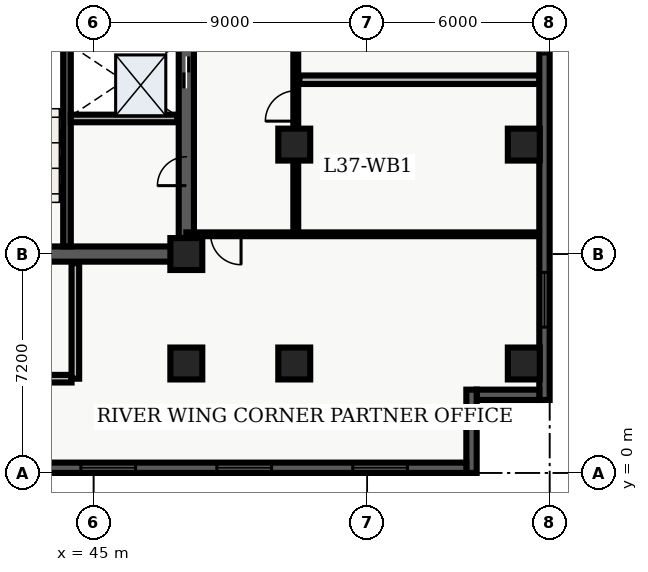
"""IFC4 building model, lengths in metres.
Left out: names, types, materials, properties, quantities, classifications, styles, units other than length and angle.
Written with IfcOpenShell. Run it as: python <this file> out.ifc"""

import sys

from ifc_helpers import new_model, entity, si_unit, converted_unit, direction, frame, origin_with_axes, origin_2d_with_axis, place, context, subcontext, project, spatial, polyline, rectangle, outline, extrude, element, fill, save


model = new_model("IFC4")
c1 = context("Model", 3, precision=1e-05, world=origin_with_axes(), true_north=direction((0.0, 1.0)))
c2 = subcontext(c1, "Body", "Model", "MODEL_VIEW")
j1 = project(units=[si_unit("LENGTHUNIT", "METRE"), converted_unit("PLANEANGLEUNIT", "DEGREE", entity("IfcPlaneAngleMeasure", 0.017), si_unit("PLANEANGLEUNIT", "RADIAN"), dimensions=[0, 0, 0, 0, 0, 0, 0])], contexts=[c1])
p1 = place(None, origin_with_axes())
s1 = spatial("IfcSite", under=j1, at=p1, CompositionType="ELEMENT")
p2 = place(p1, origin_with_axes())
s2 = spatial("IfcBuilding", under=s1, at=p2, CompositionType="ELEMENT")
p3 = place(p2, frame((0.0, 0.0, 152.4), z_axis=(0.0, 0.0, 1.0), x_axis=(1.0, 0.0, 0.0)))
s3 = spatial("IfcBuildingStorey", under=s2, at=p3, CompositionType="ELEMENT", Elevation=152.4)
p4 = place(p3, frame((40.2, 7.2, 0.0), z_axis=(0.0, 0.0, 1.0), x_axis=(1.0, 0.0, 0.0)))
e1 = element("IfcWall", 1, at=p4, inside=s3, PredefinedType="SHEAR", context=c2, shape_type="SweptSolid", body=[
    extrude(outline(polyline([(0.0, -0.25), (7.85, -0.25), (7.85, 0.25), (0.0, 0.25), (0.0, -0.25)])), origin_with_axes(), (0.0, 0.0, 1.0), 3.66),
])
p5 = place(p4, frame((2.175, 0.0, 0.0), z_axis=(0.0, 0.0, 1.0), x_axis=(1.0, 0.0, 0.0)))
e2 = element("IfcOpeningElement", 2, at=p5, cuts=e1, PredefinedType="OPENING", context=c2, shape_type="SweptSolid", body=[
    extrude(rectangle(XDim=1.05, YDim=0.52, at=origin_2d_with_axis()), origin_with_axes(), (0.0, 0.0, 1.0), 2.15),
])
p6 = place(p3, frame((48.05, 7.2, 0.0), z_axis=(0.0, 0.0, 1.0), x_axis=(0.0, 1.0, 0.0)))
e3 = element("IfcWall", 3, at=p6, inside=s3, PredefinedType="SHEAR", context=c2, shape_type="SweptSolid", body=[
    extrude(outline(polyline([(0.0, -0.25), (15.6, -0.25), (15.6, 0.25), (0.0, 0.25), (0.0, -0.25)])), origin_with_axes(), (0.0, 0.0, 1.0), 3.66),
])
p7 = place(p6, frame((5.975, 0.0, 0.0), z_axis=(0.0, 0.0, 1.0), x_axis=(1.0, 0.0, 0.0)))
e4 = element("IfcOpeningElement", 4, at=p7, cuts=e3, PredefinedType="OPENING", context=c2, shape_type="SweptSolid", body=[
    extrude(rectangle(XDim=1.05, YDim=0.52, at=origin_2d_with_axis()), origin_with_axes(), (0.0, 0.0, 1.0), 2.15),
])
p8 = place(p6, frame((2.725, 0.0, 0.0), z_axis=(0.0, 0.0, 1.0), x_axis=(1.0, 0.0, 0.0)))
e5 = element("IfcOpeningElement", 5, at=p8, cuts=e3, PredefinedType="OPENING", context=c2, shape_type="SweptSolid", body=[
    extrude(rectangle(XDim=0.95, YDim=0.52, at=origin_2d_with_axis()), origin_with_axes(), (0.0, 0.0, 1.0), 2.15),
])
p9 = place(p3, frame((44.125, 7.45, 0.0), z_axis=(0.0, 0.0, 1.0), x_axis=(0.0, 1.0, 0.0)))
e6 = element("IfcWall", 6, at=p9, inside=s3, PredefinedType="SHEAR", context=c2, shape_type="SweptSolid", body=[
    extrude(outline(polyline([(0.0, -0.125), (15.1, -0.125), (15.1, 0.125), (0.0, 0.125), (0.0, -0.125)])), origin_with_axes(), (0.0, 0.0, 1.0), 3.66),
])
p10 = place(p3, frame((40.325, 3.1, 0.0), z_axis=(0.0, 0.0, 1.0), x_axis=(1.0, 0.0, 0.0)))
e7 = element("IfcWall", 7, at=p10, inside=s3, PredefinedType="SOLIDWALL", context=c2, shape_type="SweptSolid", body=[
    extrude(outline(polyline([(0.0, -0.125), (3.95, -0.125), (3.95, 0.125), (0.0, 0.125), (0.0, -0.125)])), origin_with_axes(), (0.0, 0.0, 1.0), 2.7),
])
p11 = place(p3, frame((44.4, 3.1, 0.0), z_axis=(0.0, 0.0, 1.0), x_axis=(0.0, 1.0, 0.0)))
e8 = element("IfcWall", 8, at=p11, inside=s3, PredefinedType="SOLIDWALL", context=c2, shape_type="SweptSolid", body=[
    extrude(outline(polyline([(0.0, -0.125), (3.8, -0.125), (3.8, 0.125), (0.0, 0.125), (0.0, -0.125)])), origin_with_axes(), (0.0, 0.0, 1.0), 2.7),
])
for number, where, z_axis, x_axis in (
    (9, (48.05, 3.6, 0.0), (0.0, 0.0, 1.0), (1.0, 0.0, 0.0)),
    (10, (48.05, 7.2, 0.0), (0.0, 0.0, 1.0), (1.0, 0.0, 0.0)),
    (11, (51.6, 3.6, 0.0), (0.0, 0.0, 1.0), (1.0, 0.0, 0.0)),
    (12, (51.6, 10.8, 0.0), (0.0, 0.0, 1.0), (1.0, 0.0, 0.0)),
    (13, (59.15, 3.6, 0.0), (0.0, 0.0, 1.0), (1.0, 0.0, 0.0)),
    (14, (59.15, 10.8, 0.0), (0.0, 0.0, 1.0), (1.0, 0.0, 0.0)),
):
    element("IfcColumn", number, at=place(p3, frame(where, z_axis=z_axis, x_axis=x_axis)), inside=s3, PredefinedType="COLUMN", context=c2, shape_type="SweptSolid", body=[
        extrude(rectangle(XDim=1.05, YDim=1.05, at=origin_2d_with_axis()), origin_with_axes(), (0.0, 0.0, 1.0), 3.9),
    ])
p12 = place(p3, frame((44.25, 11.66, 0.0), z_axis=(0.0, 0.0, 1.0), x_axis=(1.0, 0.0, 0.0)))
e15 = element("IfcWall", 15, at=p12, inside=s3, PredefinedType="SOLIDWALL", context=c2, shape_type="SweptSolid", body=[
    extrude(outline(polyline([(0.0, -0.125), (3.5, -0.125), (3.5, 0.125), (0.0, 0.125), (0.0, -0.125)])), origin_with_axes(), (0.0, 0.0, 1.0), 2.7),
])
p13 = place(p3, frame((51.65, 7.85, 0.0), z_axis=(0.0, 0.0, 1.0), x_axis=(0.0, 1.0, 0.0)))
e16 = element("IfcWall", 16, at=p13, inside=s3, PredefinedType="PARTITIONING", context=c2, shape_type="SweptSolid", body=[
    extrude(outline(polyline([(0.0, -0.08), (18.8, -0.08), (18.8, 0.08), (0.0, 0.08), (0.0, -0.08)])), origin_with_axes(), (0.0, 0.0, 1.0), 2.7),
])
p14 = place(p13, frame((4.222, 0.0, 0.0), z_axis=(0.0, 0.0, 1.0), x_axis=(1.0, 0.0, 0.0)))
e17 = element("IfcOpeningElement", 17, at=p14, cuts=e16, PredefinedType="OPENING", context=c2, shape_type="SweptSolid", body=[
    extrude(rectangle(XDim=1.0, YDim=0.18, at=origin_2d_with_axis()), origin_with_axes(), (0.0, 0.0, 1.0), 2.15),
])
p15 = place(p13, frame((7.845, 0.0, 0.0), z_axis=(0.0, 0.0, 1.0), x_axis=(1.0, 0.0, 0.0)))
e18 = element("IfcOpeningElement", 18, at=p15, cuts=e16, PredefinedType="OPENING", context=c2, shape_type="SweptSolid", body=[
    extrude(rectangle(XDim=1.0, YDim=0.18, at=origin_2d_with_axis()), origin_with_axes(), (0.0, 0.0, 1.0), 2.15),
])
p16 = place(p13, frame((14.072, 0.0, 0.0), z_axis=(0.0, 0.0, 1.0), x_axis=(1.0, 0.0, 0.0)))
e19 = element("IfcOpeningElement", 19, at=p16, cuts=e16, PredefinedType="OPENING", context=c2, shape_type="SweptSolid", body=[
    extrude(rectangle(XDim=1.0, YDim=0.18, at=origin_2d_with_axis()), origin_with_axes(), (0.0, 0.0, 1.0), 2.15),
])
p17 = place(p3, frame((59.665, 7.85, 0.0), z_axis=(0.0, 0.0, 1.0), x_axis=(-1.0, 0.0, 0.0)))
e20 = element("IfcWall", 20, at=p17, inside=s3, PredefinedType="PARTITIONING", context=c2, shape_type="SweptSolid", body=[
    extrude(outline(polyline([(0.0, -0.062), (11.615, -0.062), (11.615, 0.062), (0.0, 0.062), (0.0, -0.062)])), origin_with_axes(), (0.0, 0.0, 1.0), 2.7),
])
p18 = place(p17, frame((10.315, 0.0, 0.0), z_axis=(0.0, 0.0, 1.0), x_axis=(1.0, 0.0, 0.0)))
e21 = element("IfcOpeningElement", 21, at=p18, cuts=e20, PredefinedType="OPENING", context=c2, shape_type="SweptSolid", body=[
    extrude(rectangle(XDim=1.0, YDim=0.145, at=origin_2d_with_axis()), origin_with_axes(), (0.0, 0.0, 1.0), 2.15),
])
p19 = place(p3, frame((51.77, 12.934, 0.0), z_axis=(0.0, 0.0, 1.0), x_axis=(1.0, 0.0, 0.0)))
e22 = element("IfcWall", 22, at=p19, inside=s3, PredefinedType="PARTITIONING", context=c2, shape_type="SweptSolid", body=[
    extrude(outline(polyline([(0.0, -0.14), (7.895, -0.14), (7.895, 0.14), (0.0, 0.14), (0.0, -0.14)])), origin_with_axes(), (0.0, 0.0, 1.0), 2.7),
])
p20 = place(p3, frame((59.83, 26.06, 0.0), z_axis=(0.0, 0.0, 1.0), x_axis=(0.0, -1.0, 0.0)))
e23 = element("IfcWall", 23, at=p20, inside=s3, PredefinedType="SOLIDWALL", context=c2, shape_type="SweptSolid", body=[
    extrude(outline(polyline([(0.0, -0.17), (23.66, -0.17), (23.66, 0.17), (0.0, 0.17), (0.0, -0.17)])), origin_with_axes(), (0.0, 0.0, 1.0), 3.66),
])
p21 = place(p20, frame((3.696, 0.0, 0.45), z_axis=(0.0, 0.0, 1.0), x_axis=(1.0, 0.0, 0.0)))
e24 = element("IfcOpeningElement", 24, at=p21, cuts=e23, PredefinedType="OPENING", context=c2, shape_type="SweptSolid", body=[
    extrude(rectangle(XDim=1.8, YDim=0.36, at=origin_2d_with_axis()), origin_with_axes(), (0.0, 0.0, 1.0), 2.1),
])
p22 = place(p20, frame((11.38, 0.0, 0.45), z_axis=(0.0, 0.0, 1.0), x_axis=(1.0, 0.0, 0.0)))
e25 = element("IfcOpeningElement", 25, at=p22, cuts=e23, PredefinedType="OPENING", context=c2, shape_type="SweptSolid", body=[
    extrude(rectangle(XDim=1.8, YDim=0.36, at=origin_2d_with_axis()), origin_with_axes(), (0.0, 0.0, 1.0), 2.1),
])
p23 = place(p20, frame((20.364, 0.0, 0.45), z_axis=(0.0, 0.0, 1.0), x_axis=(1.0, 0.0, 0.0)))
e26 = element("IfcOpeningElement", 26, at=p23, cuts=e23, PredefinedType="OPENING", context=c2, shape_type="SweptSolid", body=[
    extrude(rectangle(XDim=1.8, YDim=0.36, at=origin_2d_with_axis()), origin_with_axes(), (0.0, 0.0, 1.0), 2.1),
])
p24 = place(p3, frame((59.66, 2.57, 0.0), z_axis=(0.0, 0.0, 1.0), x_axis=(-1.0, 0.0, 0.0)))
e27 = element("IfcWall", 27, at=p24, inside=s3, PredefinedType="SOLIDWALL", context=c2, shape_type="SweptSolid", body=[
    extrude(outline(polyline([(0.0, -0.17), (2.06, -0.17), (2.06, 0.17), (0.0, 0.17), (0.0, -0.17)])), origin_with_axes(), (0.0, 0.0, 1.0), 3.66),
])
p25 = place(p3, frame((57.43, 2.74, 0.0), z_axis=(0.0, 0.0, 1.0), x_axis=(0.0, -1.0, 0.0)))
e28 = element("IfcWall", 28, at=p25, inside=s3, PredefinedType="SOLIDWALL", context=c2, shape_type="SweptSolid", body=[
    extrude(outline(polyline([(0.0, -0.17), (2.74, -0.17), (2.74, 0.17), (0.0, 0.17), (0.0, -0.17)])), origin_with_axes(), (0.0, 0.0, 1.0), 3.66),
])
p26 = place(p3, frame((57.26, 0.17, 0.0), z_axis=(0.0, 0.0, 1.0), x_axis=(-1.0, 0.0, 0.0)))
e29 = element("IfcWall", 29, at=p26, inside=s3, PredefinedType="SOLIDWALL", context=c2, shape_type="SweptSolid", body=[
    extrude(outline(polyline([(0.0, -0.17), (54.86, -0.17), (54.86, 0.17), (0.0, 0.17), (0.0, -0.17)])), origin_with_axes(), (0.0, 0.0, 1.0), 3.66),
])
p27 = place(p26, frame((2.836, 0.0, 0.45), z_axis=(0.0, 0.0, 1.0), x_axis=(1.0, 0.0, 0.0)))
e30 = element("IfcOpeningElement", 30, at=p27, cuts=e29, PredefinedType="OPENING", context=c2, shape_type="SweptSolid", body=[
    extrude(rectangle(XDim=1.8, YDim=0.36, at=origin_2d_with_axis()), origin_with_axes(), (0.0, 0.0, 1.0), 2.1),
])
p28 = place(p26, frame((7.307, 0.0, 0.45), z_axis=(0.0, 0.0, 1.0), x_axis=(1.0, 0.0, 0.0)))
e31 = element("IfcOpeningElement", 31, at=p28, cuts=e29, PredefinedType="OPENING", context=c2, shape_type="SweptSolid", body=[
    extrude(rectangle(XDim=1.8, YDim=0.36, at=origin_2d_with_axis()), origin_with_axes(), (0.0, 0.0, 1.0), 2.1),
])
p29 = place(p26, frame((11.779, 0.0, 0.45), z_axis=(0.0, 0.0, 1.0), x_axis=(1.0, 0.0, 0.0)))
e32 = element("IfcOpeningElement", 32, at=p29, cuts=e29, PredefinedType="OPENING", context=c2, shape_type="SweptSolid", body=[
    extrude(rectangle(XDim=1.8, YDim=0.36, at=origin_2d_with_axis()), origin_with_axes(), (0.0, 0.0, 1.0), 2.1),
])
p30 = place(p26, frame((16.251, 0.0, 0.45), z_axis=(0.0, 0.0, 1.0), x_axis=(1.0, 0.0, 0.0)))
e33 = element("IfcOpeningElement", 33, at=p30, cuts=e29, PredefinedType="OPENING", context=c2, shape_type="SweptSolid", body=[
    extrude(rectangle(XDim=1.8, YDim=0.36, at=origin_2d_with_axis()), origin_with_axes(), (0.0, 0.0, 1.0), 2.1),
])
p31 = place(p26, frame((20.723, 0.0, 0.45), z_axis=(0.0, 0.0, 1.0), x_axis=(1.0, 0.0, 0.0)))
e34 = element("IfcOpeningElement", 34, at=p31, cuts=e29, PredefinedType="OPENING", context=c2, shape_type="SweptSolid", body=[
    extrude(rectangle(XDim=1.8, YDim=0.36, at=origin_2d_with_axis()), origin_with_axes(), (0.0, 0.0, 1.0), 2.1),
])
p32 = place(p26, frame((25.194, 0.0, 0.45), z_axis=(0.0, 0.0, 1.0), x_axis=(1.0, 0.0, 0.0)))
e35 = element("IfcOpeningElement", 35, at=p32, cuts=e29, PredefinedType="OPENING", context=c2, shape_type="SweptSolid", body=[
    extrude(rectangle(XDim=1.8, YDim=0.36, at=origin_2d_with_axis()), origin_with_axes(), (0.0, 0.0, 1.0), 2.1),
])
p33 = place(p26, frame((29.666, 0.0, 0.45), z_axis=(0.0, 0.0, 1.0), x_axis=(1.0, 0.0, 0.0)))
e36 = element("IfcOpeningElement", 36, at=p33, cuts=e29, PredefinedType="OPENING", context=c2, shape_type="SweptSolid", body=[
    extrude(rectangle(XDim=1.8, YDim=0.36, at=origin_2d_with_axis()), origin_with_axes(), (0.0, 0.0, 1.0), 2.1),
])
p34 = place(p26, frame((34.138, 0.0, 0.45), z_axis=(0.0, 0.0, 1.0), x_axis=(1.0, 0.0, 0.0)))
e37 = element("IfcOpeningElement", 37, at=p34, cuts=e29, PredefinedType="OPENING", context=c2, shape_type="SweptSolid", body=[
    extrude(rectangle(XDim=1.8, YDim=0.36, at=origin_2d_with_axis()), origin_with_axes(), (0.0, 0.0, 1.0), 2.1),
])
p35 = place(p26, frame((38.609, 0.0, 0.45), z_axis=(0.0, 0.0, 1.0), x_axis=(1.0, 0.0, 0.0)))
e38 = element("IfcOpeningElement", 38, at=p35, cuts=e29, PredefinedType="OPENING", context=c2, shape_type="SweptSolid", body=[
    extrude(rectangle(XDim=1.8, YDim=0.36, at=origin_2d_with_axis()), origin_with_axes(), (0.0, 0.0, 1.0), 2.1),
])
p36 = place(p26, frame((43.081, 0.0, 0.45), z_axis=(0.0, 0.0, 1.0), x_axis=(1.0, 0.0, 0.0)))
e39 = element("IfcOpeningElement", 39, at=p36, cuts=e29, PredefinedType="OPENING", context=c2, shape_type="SweptSolid", body=[
    extrude(rectangle(XDim=1.8, YDim=0.36, at=origin_2d_with_axis()), origin_with_axes(), (0.0, 0.0, 1.0), 2.1),
])
p37 = place(p26, frame((48.003, 0.0, 0.45), z_axis=(0.0, 0.0, 1.0), x_axis=(1.0, 0.0, 0.0)))
e40 = element("IfcOpeningElement", 40, at=p37, cuts=e29, PredefinedType="OPENING", context=c2, shape_type="SweptSolid", body=[
    extrude(rectangle(XDim=1.8, YDim=0.36, at=origin_2d_with_axis()), origin_with_axes(), (0.0, 0.0, 1.0), 2.1),
])
p38 = place(p26, frame((52.024, 0.0, 0.45), z_axis=(0.0, 0.0, 1.0), x_axis=(1.0, 0.0, 0.0)))
e41 = element("IfcOpeningElement", 41, at=p38, cuts=e29, PredefinedType="OPENING", context=c2, shape_type="SweptSolid", body=[
    extrude(rectangle(XDim=1.8, YDim=0.36, at=origin_2d_with_axis()), origin_with_axes(), (0.0, 0.0, 1.0), 2.1),
])
p39 = place(p6, frame((5.975, 0.0, 0.0), z_axis=(0.0, 0.0, 1.0), x_axis=(1.0, 0.0, 0.0)))
e42 = element("IfcDoor", 42, at=p39, inside=s3, OperationType="SLIDING_TO_LEFT", PredefinedType="DOOR", context=c2, shape_type="SweptSolid", body=[
    extrude(rectangle(XDim=1.05, YDim=0.09, at=origin_2d_with_axis()), origin_with_axes(), (0.0, 0.0, 1.0), 2.15),
])
fill(e4, e42)
p40 = place(p6, frame((2.725, 0.0, 0.0), z_axis=(0.0, 0.0, 1.0), x_axis=(1.0, 0.0, 0.0)))
e43 = element("IfcDoor", 43, at=p40, inside=s3, OperationType="SINGLE_SWING_LEFT", PredefinedType="DOOR", context=c2, shape_type="SweptSolid", body=[
    extrude(rectangle(XDim=0.95, YDim=0.09, at=origin_2d_with_axis()), origin_with_axes(), (0.0, 0.0, 1.0), 2.15),
])
fill(e5, e43)
p41 = place(p17, frame((10.315, 0.0, 0.0), z_axis=(0.0, 0.0, 1.0), x_axis=(1.0, 0.0, 0.0)))
e44 = element("IfcDoor", 44, at=p41, inside=s3, OperationType="SINGLE_SWING_LEFT", PredefinedType="DOOR", context=c2, shape_type="SweptSolid", body=[
    extrude(rectangle(XDim=1.0, YDim=0.075, at=origin_2d_with_axis()), origin_with_axes(), (0.0, 0.0, 1.0), 2.15),
])
fill(e21, e44)
p42 = place(p13, frame((4.222, 0.0, 0.0), z_axis=(0.0, 0.0, 1.0), x_axis=(1.0, 0.0, 0.0)))
e45 = element("IfcDoor", 45, at=p42, inside=s3, OperationType="SINGLE_SWING_LEFT", PredefinedType="DOOR", context=c2, shape_type="SweptSolid", body=[
    extrude(rectangle(XDim=1.0, YDim=0.09, at=origin_2d_with_axis()), origin_with_axes(), (0.0, 0.0, 1.0), 2.15),
])
fill(e17, e45)
p43 = place(p20, frame((11.38, 0.0, 0.45), z_axis=(0.0, 0.0, 1.0), x_axis=(1.0, 0.0, 0.0)))
e46 = element("IfcWindow", 46, at=p43, inside=s3, PredefinedType="WINDOW", context=c2, shape_type="SweptSolid", body=[
    extrude(rectangle(XDim=1.8, YDim=0.09, at=origin_2d_with_axis()), origin_with_axes(), (0.0, 0.0, 1.0), 2.1),
])
fill(e25, e46)
p44 = place(p20, frame((20.364, 0.0, 0.45), z_axis=(0.0, 0.0, 1.0), x_axis=(1.0, 0.0, 0.0)))
e47 = element("IfcWindow", 47, at=p44, inside=s3, PredefinedType="WINDOW", context=c2, shape_type="SweptSolid", body=[
    extrude(rectangle(XDim=1.8, YDim=0.09, at=origin_2d_with_axis()), origin_with_axes(), (0.0, 0.0, 1.0), 2.1),
])
fill(e26, e47)
p45 = place(p26, frame((2.836, 0.0, 0.45), z_axis=(0.0, 0.0, 1.0), x_axis=(1.0, 0.0, 0.0)))
e48 = element("IfcWindow", 48, at=p45, inside=s3, PredefinedType="WINDOW", context=c2, shape_type="SweptSolid", body=[
    extrude(rectangle(XDim=1.8, YDim=0.09, at=origin_2d_with_axis()), origin_with_axes(), (0.0, 0.0, 1.0), 2.1),
])
fill(e30, e48)
p46 = place(p26, frame((7.307, 0.0, 0.45), z_axis=(0.0, 0.0, 1.0), x_axis=(1.0, 0.0, 0.0)))
e49 = element("IfcWindow", 49, at=p46, inside=s3, PredefinedType="WINDOW", context=c2, shape_type="SweptSolid", body=[
    extrude(rectangle(XDim=1.8, YDim=0.09, at=origin_2d_with_axis()), origin_with_axes(), (0.0, 0.0, 1.0), 2.1),
])
fill(e31, e49)
p47 = place(p26, frame((11.779, 0.0, 0.45), z_axis=(0.0, 0.0, 1.0), x_axis=(1.0, 0.0, 0.0)))
e50 = element("IfcWindow", 50, at=p47, inside=s3, PredefinedType="WINDOW", context=c2, shape_type="SweptSolid", body=[
    extrude(rectangle(XDim=1.8, YDim=0.09, at=origin_2d_with_axis()), origin_with_axes(), (0.0, 0.0, 1.0), 2.1),
])
fill(e32, e50)
save(model, sys.argv[1])
